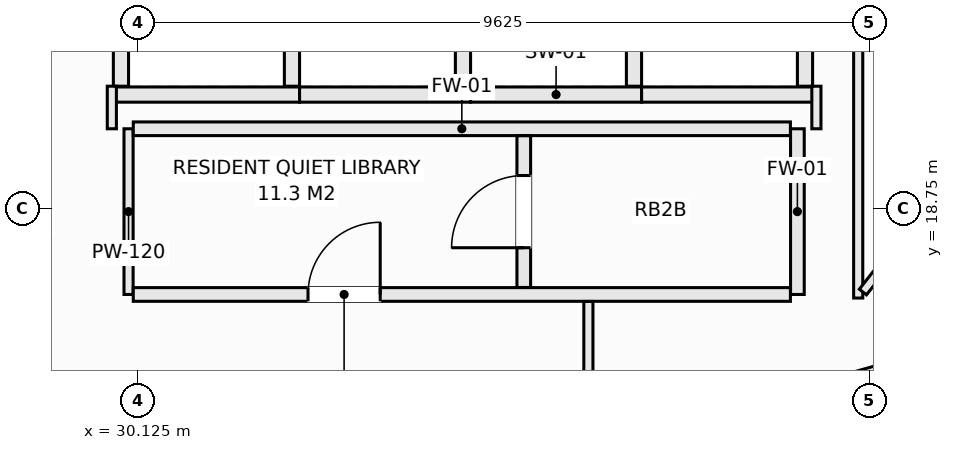
"""IFC4 building model, lengths in metres.
Left out: names, types, materials, properties, quantities, classifications, styles, units other than length and angle.
Written with IfcOpenShell. Run it as: python <this file> out.ifc"""

import sys

from ifc_helpers import new_model, si_unit, direction, frame, frame_2d, origin, place, context, subcontext, project, spatial, rectangle, extrude, element, fill, save


model = new_model("IFC4")
c1 = context("Model", 3, precision=1e-05, world=origin(), true_north=direction((0.0, 1.0)))
c2 = subcontext(c1, "Body", "Model", "MODEL_VIEW")
j1 = project(units=[si_unit("LENGTHUNIT", "METRE"), si_unit("PLANEANGLEUNIT", "RADIAN")], contexts=[c1])
p1 = place(None, origin())
s1 = spatial("IfcSite", under=j1, at=p1, CompositionType="ELEMENT")
p2 = place(p1, origin())
s2 = spatial("IfcBuilding", under=s1, at=p2, CompositionType="ELEMENT")
p3 = place(p2, frame((0.0, 0.0, 272.3)))
s3 = spatial("IfcBuildingStorey", under=s2, at=p3, CompositionType="ELEMENT", Elevation=272.3)
p4 = place(p3, frame((29.8, 20.25, 0.0), z_axis=(0.0, 0.0, 1.0), x_axis=(1.0, 0.0, 0.0)))
e1 = element("IfcWall", 1, at=p4, inside=s3, PredefinedType="SOLIDWALL", context=c2, shape_type="SweptSolid", body=[
    extrude(rectangle(XDim=2.45, YDim=0.2, at=frame_2d((1.225, 0.0))), origin(), (0.0, 0.0, 1.0), 2.98),
])
for number, where, z_axis, x_axis in (
    (2, (29.9, 20.36, 0.0), (0.0, 0.0, 1.0), (0.0, 1.0, 0.0)),
    (3, (32.15, 20.36, 0.0), (0.0, 0.0, 1.0), (0.0, 1.0, 0.0)),
):
    element("IfcWall", number, at=place(p3, frame(where, z_axis=z_axis, x_axis=x_axis)), inside=s3, PredefinedType="SOLIDWALL", context=c2, shape_type="SweptSolid", body=[
        extrude(rectangle(XDim=2.43, YDim=0.2, at=frame_2d((1.215, 0.0))), origin(), (0.0, 0.0, 1.0), 2.98),
    ])
p5 = place(p3, frame((32.25, 20.25, 0.0), z_axis=(0.0, 0.0, 1.0), x_axis=(1.0, 0.0, 0.0)))
e4 = element("IfcWall", 4, at=p5, inside=s3, PredefinedType="SOLIDWALL", context=c2, shape_type="SweptSolid", body=[
    extrude(rectangle(XDim=2.25, YDim=0.2, at=frame_2d((1.125, 0.0))), origin(), (0.0, 0.0, 1.0), 2.98),
])
p6 = place(p3, frame((34.4, 20.36, 0.0), z_axis=(0.0, 0.0, 1.0), x_axis=(0.0, 1.0, 0.0)))
e5 = element("IfcWall", 5, at=p6, inside=s3, PredefinedType="SOLIDWALL", context=c2, shape_type="SweptSolid", body=[
    extrude(rectangle(XDim=2.43, YDim=0.2, at=frame_2d((1.215, 0.0))), origin(), (0.0, 0.0, 1.0), 2.98),
])
p7 = place(p3, frame((34.5, 20.25, 0.0), z_axis=(0.0, 0.0, 1.0), x_axis=(1.0, 0.0, 0.0)))
e6 = element("IfcWall", 6, at=p7, inside=s3, PredefinedType="SOLIDWALL", context=c2, shape_type="SweptSolid", body=[
    extrude(rectangle(XDim=2.25, YDim=0.2, at=frame_2d((1.125, 0.0))), origin(), (0.0, 0.0, 1.0), 2.98),
])
p8 = place(p3, frame((36.65, 20.36, 0.0), z_axis=(0.0, 0.0, 1.0), x_axis=(0.0, 1.0, 0.0)))
e7 = element("IfcWall", 7, at=p8, inside=s3, PredefinedType="SOLIDWALL", context=c2, shape_type="SweptSolid", body=[
    extrude(rectangle(XDim=2.43, YDim=0.2, at=frame_2d((1.215, 0.0))), origin(), (0.0, 0.0, 1.0), 2.98),
])
p9 = place(p3, frame((36.75, 20.25, 0.0), z_axis=(0.0, 0.0, 1.0), x_axis=(1.0, 0.0, 0.0)))
e8 = element("IfcWall", 8, at=p9, inside=s3, PredefinedType="SOLIDWALL", context=c2, shape_type="SweptSolid", body=[
    extrude(rectangle(XDim=2.25, YDim=0.2, at=frame_2d((1.125, 0.0))), origin(), (0.0, 0.0, 1.0), 2.98),
])
p10 = place(p3, frame((38.9, 20.36, 0.0), z_axis=(0.0, 0.0, 1.0), x_axis=(0.0, 1.0, 0.0)))
e9 = element("IfcWall", 9, at=p10, inside=s3, PredefinedType="SOLIDWALL", context=c2, shape_type="SweptSolid", body=[
    extrude(rectangle(XDim=2.43, YDim=0.2, at=frame_2d((1.215, 0.0))), origin(), (0.0, 0.0, 1.0), 2.98),
])
p11 = place(p3, frame((30.0, 17.62, 0.0), z_axis=(0.0, 0.0, 1.0), x_axis=(0.0, 1.0, 0.0)))
e10 = element("IfcWall", 10, at=p11, inside=s3, PredefinedType="PARTITIONING", context=c2, shape_type="SweptSolid", body=[
    extrude(rectangle(XDim=2.18, YDim=0.12, at=frame_2d((1.09, 0.0))), origin(), (0.0, 0.0, 1.0), 2.98),
])
p12 = place(p3, frame((38.8, 17.62, 0.0), z_axis=(0.0, 0.0, 1.0), x_axis=(0.0, 1.0, 0.0)))
e11 = element("IfcWall", 11, at=p12, inside=s3, PredefinedType="SOLIDWALL", context=c2, shape_type="SweptSolid", body=[
    extrude(rectangle(XDim=2.18, YDim=0.18, at=frame_2d((1.09, 0.0))), origin(), (0.0, 0.0, 1.0), 2.98),
])
p13 = place(p3, frame((30.062, 17.62, 0.0), z_axis=(0.0, 0.0, 1.0), x_axis=(1.0, 0.0, 0.0)))
e12 = element("IfcWall", 12, at=p13, inside=s3, PredefinedType="SOLIDWALL", context=c2, shape_type="SweptSolid", body=[
    extrude(rectangle(XDim=8.646, YDim=0.18, at=frame_2d((4.323, 0.0))), origin(), (0.0, 0.0, 1.0), 2.98),
])
p14 = place(p13, frame((2.299, 0.0, 0.0)))
e13 = element("IfcOpeningElement", 13, at=p14, cuts=e12, PredefinedType="OPENING", context=c2, shape_type="SweptSolid", body=[
    extrude(rectangle(XDim=0.95, YDim=2.1, at=frame_2d((0.475, 1.05))), frame((0.0, 0.1, 0.0), z_axis=(0.0, -1.0, 0.0), x_axis=(1.0, 0.0, 0.0)), (0.0, 0.0, 1.0), 0.2),
])
p15 = place(p3, frame((30.062, 19.8, 0.0), z_axis=(0.0, 0.0, 1.0), x_axis=(1.0, 0.0, 0.0)))
e14 = element("IfcWall", 14, at=p15, inside=s3, PredefinedType="SOLIDWALL", context=c2, shape_type="SweptSolid", body=[
    extrude(rectangle(XDim=8.646, YDim=0.18, at=frame_2d((4.323, 0.0))), origin(), (0.0, 0.0, 1.0), 2.98),
])
p16 = place(p3, frame((35.2, 17.712, 0.0), z_axis=(0.0, 0.0, 1.0), x_axis=(0.0, 1.0, 0.0)))
e15 = element("IfcWall", 15, at=p16, inside=s3, PredefinedType="SOLIDWALL", context=c2, shape_type="SweptSolid", body=[
    extrude(rectangle(XDim=1.996, YDim=0.18, at=frame_2d((0.998, 0.0))), origin(), (0.0, 0.0, 1.0), 2.98),
])
p17 = place(p16, frame((0.523, 0.0, 0.0)))
e16 = element("IfcOpeningElement", 16, at=p17, cuts=e15, PredefinedType="OPENING", context=c2, shape_type="SweptSolid", body=[
    extrude(rectangle(XDim=0.95, YDim=2.1, at=frame_2d((0.475, 1.05))), frame((0.0, 0.1, 0.0), z_axis=(0.0, -1.0, 0.0), x_axis=(1.0, 0.0, 0.0)), (0.0, 0.0, 1.0), 0.2),
])
p18 = place(p3, frame((39.05, 19.8, 0.0), z_axis=(0.0, 0.0, 1.0), x_axis=(0.0, 1.0, 0.0)))
e17 = element("IfcWall", 17, at=p18, inside=s3, PredefinedType="PARTITIONING", context=c2, shape_type="SweptSolid", body=[
    extrude(rectangle(XDim=0.56, YDim=0.12, at=frame_2d((0.28, 0.0))), origin(), (0.0, 0.0, 1.0), 2.98),
])
p19 = place(p3, frame((39.6, 17.573, 0.0), z_axis=(0.0, 0.0, 1.0), x_axis=(0.0, 1.0, 0.0)))
e18 = element("IfcWall", 18, at=p19, inside=s3, PredefinedType="PARTITIONING", context=c2, shape_type="SweptSolid", body=[
    extrude(rectangle(XDim=5.447, YDim=0.12, at=frame_2d((2.724, 0.0))), origin(), (0.0, 0.0, 1.0), 2.428),
])
p20 = place(p3, frame((39.662, 17.652, 0.0), z_axis=(0.0, 0.0, 1.0), x_axis=(0.616212345115, 0.78758005671, 0.0)))
e19 = element("IfcWall", 19, at=p20, inside=s3, PredefinedType="PARTITIONING", context=c2, shape_type="SweptSolid", body=[
    extrude(rectangle(XDim=2.333, YDim=0.12, at=frame_2d((1.167, 0.0))), origin(), (0.0, 0.0, 1.0), 2.428),
])
p21 = place(p3, frame((29.78, 19.8, 0.0), z_axis=(0.0, 0.0, 1.0), x_axis=(0.0, 1.0, 0.0)))
e20 = element("IfcWall", 20, at=p21, inside=s3, PredefinedType="PARTITIONING", context=c2, shape_type="SweptSolid", body=[
    extrude(rectangle(XDim=0.56, YDim=0.12, at=frame_2d((0.28, 0.0))), origin(), (0.0, 0.0, 1.0), 2.98),
])
p22 = place(p3, frame((36.05, 14.95, 0.0), z_axis=(0.0, 0.0, 1.0), x_axis=(0.0, 1.0, 0.0)))
e21 = element("IfcWall", 21, at=p22, inside=s3, PredefinedType="PARTITIONING", context=c2, shape_type="SweptSolid", body=[
    extrude(rectangle(XDim=2.578, YDim=0.12, at=frame_2d((1.289, 0.0))), origin(), (0.0, 0.0, 1.0), 2.98),
])
p23 = place(p3, frame((36.112, 15.569, 0.0), z_axis=(0.0, 0.0, 1.0), x_axis=(0.962301671602, 0.271984361373, 0.0)))
e22 = element("IfcWall", 22, at=p23, inside=s3, PredefinedType="PARTITIONING", context=c2, shape_type="SweptSolid", body=[
    extrude(rectangle(XDim=11.858, YDim=0.12, at=frame_2d((5.929, 0.0))), origin(), (0.0, 0.0, 1.0), 2.555),
])
p24 = place(p3, frame((37.037, 15.704, 0.0), z_axis=(0.0, 0.0, 1.0), x_axis=(0.988053020488, 0.154114336465, 0.0)))
e23 = element("IfcWall", 23, at=p24, inside=s3, PredefinedType="PARTITIONING", context=c2, shape_type="SweptSolid", body=[
    extrude(rectangle(XDim=6.411, YDim=0.12, at=frame_2d((3.206, 0.0))), origin(), (0.0, 0.0, 1.0), 2.98),
])
p25 = place(p14, origin())
e24 = element("IfcDoor", 24, at=p25, inside=s3, OperationType="SINGLE_SWING_RIGHT", PredefinedType="DOOR", context=c2, shape_type="SweptSolid", body=[
    extrude(rectangle(XDim=0.95, YDim=2.1, at=frame_2d((0.475, 1.05))), frame((0.0, 0.025, 0.0), z_axis=(0.0, -1.0, 0.0), x_axis=(1.0, 0.0, 0.0)), (0.0, 0.0, 1.0), 0.05),
])
fill(e13, e24)
p26 = place(p17, origin())
e25 = element("IfcDoor", 25, at=p26, inside=s3, OperationType="SINGLE_SWING_LEFT", PredefinedType="DOOR", context=c2, shape_type="SweptSolid", body=[
    extrude(rectangle(XDim=0.95, YDim=2.1, at=frame_2d((0.475, 1.05))), frame((0.0, 0.025, 0.0), z_axis=(0.0, -1.0, 0.0), x_axis=(1.0, 0.0, 0.0)), (0.0, 0.0, 1.0), 0.05),
])
fill(e16, e25)
save(model, sys.argv[1])
